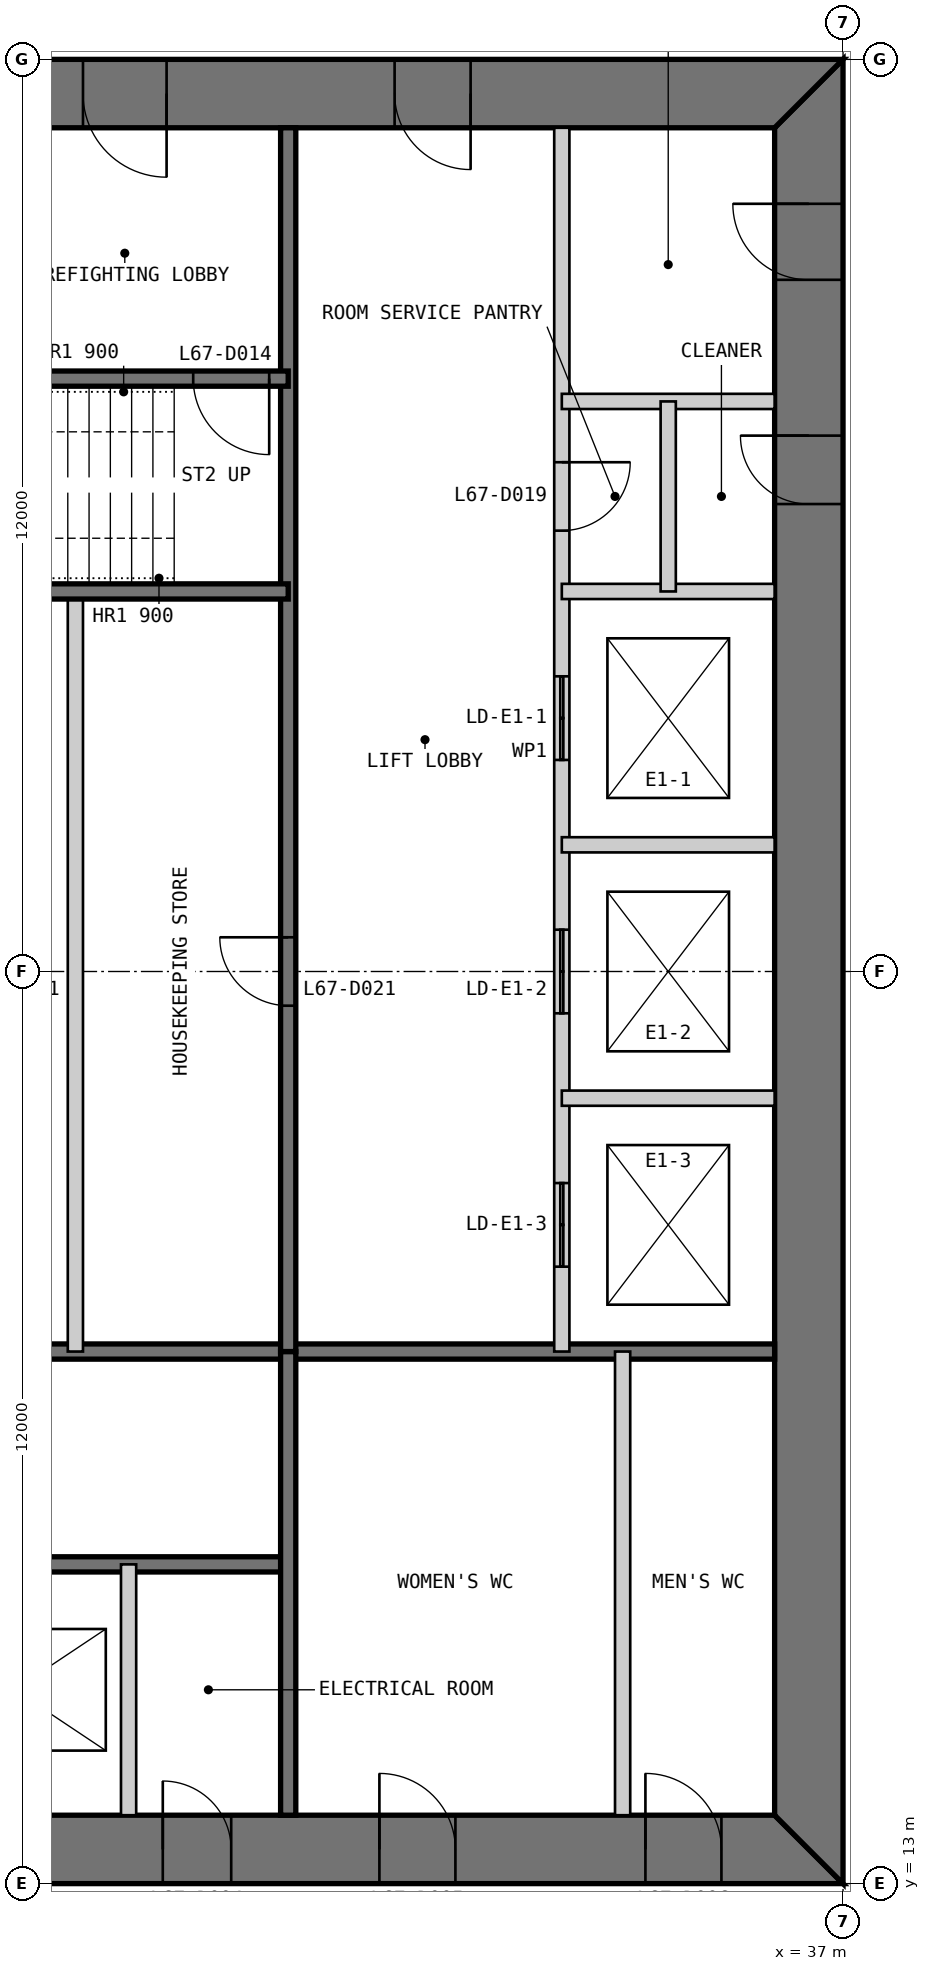
"""IFC4 building model, lengths in metres.
Left out: names, types, materials, properties, quantities, classifications, styles, units other than length and angle.
Written with IfcOpenShell. Run it as: python <this file> out.ifc"""

import sys

from ifc_helpers import new_model, si_unit, direction, frame, frame_2d, origin, place, context, subcontext, project, spatial, polyline, rectangle, outline, extrude, element, fill, save


model = new_model("IFC4")
c1 = context("Model", 3, precision=1e-05, world=origin(), true_north=direction((0.0, 1.0)))
c2 = subcontext(c1, "Body", "Model", "MODEL_VIEW")
j1 = project(units=[si_unit("LENGTHUNIT", "METRE"), si_unit("PLANEANGLEUNIT", "RADIAN")], contexts=[c1])
p1 = place(None, origin())
s1 = spatial("IfcSite", under=j1, at=p1, CompositionType="ELEMENT")
p2 = place(p1, origin())
s2 = spatial("IfcBuilding", under=s1, at=p2, CompositionType="ELEMENT")
p3 = place(p2, frame((0.0, 0.0, 279.8)))
s3 = spatial("IfcBuildingStorey", under=s2, at=p3, CompositionType="ELEMENT", Elevation=279.8)
p4 = place(p3, frame((13.0, 13.45, 0.0), z_axis=(0.0, 0.0, 1.0), x_axis=(1.0, 0.0, 0.0)))
e1 = element("IfcWall", 1, at=p4, inside=s3, PredefinedType="SHEAR", context=c2, shape_type="SweptSolid", body=[
    extrude(outline(polyline([(0.0, -0.45), (24.0, -0.45), (23.1, 0.45), (0.9, 0.45), (0.0, -0.45)])), origin(), (0.0, 0.0, 1.0), 3.4),
])
p5 = place(p4, frame((4.9, 0.0, 0.0)))
e2 = element("IfcOpeningElement", 2, at=p5, cuts=e1, PredefinedType="OPENING", context=c2, shape_type="SweptSolid", body=[
    extrude(rectangle(XDim=1.0, YDim=2.2, at=frame_2d((0.5, 1.1))), frame((0.0, 0.46, 0.0), z_axis=(0.0, -1.0, 0.0), x_axis=(1.0, 0.0, 0.0)), (0.0, 0.0, 1.0), 0.92),
])
p6 = place(p4, frame((8.9, 0.0, 0.0)))
e3 = element("IfcOpeningElement", 3, at=p6, cuts=e1, PredefinedType="OPENING", context=c2, shape_type="SweptSolid", body=[
    extrude(rectangle(XDim=1.1, YDim=2.2, at=frame_2d((0.55, 1.1))), frame((0.0, 0.46, 0.0), z_axis=(0.0, -1.0, 0.0), x_axis=(1.0, 0.0, 0.0)), (0.0, 0.0, 1.0), 0.92),
])
p7 = place(p4, frame((15.05, 0.0, 0.0)))
e4 = element("IfcOpeningElement", 4, at=p7, cuts=e1, PredefinedType="OPENING", context=c2, shape_type="SweptSolid", body=[
    extrude(rectangle(XDim=0.9, YDim=2.2, at=frame_2d((0.45, 1.1))), frame((0.0, 0.46, 0.0), z_axis=(0.0, -1.0, 0.0), x_axis=(1.0, 0.0, 0.0)), (0.0, 0.0, 1.0), 0.92),
])
p8 = place(p4, frame((17.9, 0.0, 0.0)))
e5 = element("IfcOpeningElement", 5, at=p8, cuts=e1, PredefinedType="OPENING", context=c2, shape_type="SweptSolid", body=[
    extrude(rectangle(XDim=1.0, YDim=2.2, at=frame_2d((0.5, 1.1))), frame((0.0, 0.46, 0.0), z_axis=(0.0, -1.0, 0.0), x_axis=(1.0, 0.0, 0.0)), (0.0, 0.0, 1.0), 0.92),
])
p9 = place(p4, frame((21.4, 0.0, 0.0)))
e6 = element("IfcOpeningElement", 6, at=p9, cuts=e1, PredefinedType="OPENING", context=c2, shape_type="SweptSolid", body=[
    extrude(rectangle(XDim=1.0, YDim=2.2, at=frame_2d((0.5, 1.1))), frame((0.0, 0.46, 0.0), z_axis=(0.0, -1.0, 0.0), x_axis=(1.0, 0.0, 0.0)), (0.0, 0.0, 1.0), 0.92),
])
p10 = place(p3, frame((36.55, 13.9, 0.0), z_axis=(0.0, 0.0, 1.0), x_axis=(0.0, 1.0, 0.0)))
e7 = element("IfcWall", 7, at=p10, inside=s3, PredefinedType="SHEAR", context=c2, shape_type="SweptSolid", body=[
    extrude(outline(polyline([(-0.9, -0.45), (23.1, -0.45), (22.2, 0.45), (0.0, 0.45), (-0.9, -0.45)])), origin(), (0.0, 0.0, 1.0), 3.4),
])
p11 = place(p10, frame((20.2, 0.0, 0.0)))
e8 = element("IfcOpeningElement", 8, at=p11, cuts=e7, PredefinedType="OPENING", context=c2, shape_type="SweptSolid", body=[
    extrude(rectangle(XDim=1.0, YDim=2.2, at=frame_2d((0.5, 1.1))), frame((0.0, 0.46, 0.0), z_axis=(0.0, -1.0, 0.0), x_axis=(1.0, 0.0, 0.0)), (0.0, 0.0, 1.0), 0.92),
])
p12 = place(p10, frame((17.25, 0.0, 0.0)))
e9 = element("IfcOpeningElement", 9, at=p12, cuts=e7, PredefinedType="OPENING", context=c2, shape_type="SweptSolid", body=[
    extrude(rectangle(XDim=0.9, YDim=2.2, at=frame_2d((0.45, 1.1))), frame((0.0, 0.46, 0.0), z_axis=(0.0, -1.0, 0.0), x_axis=(1.0, 0.0, 0.0)), (0.0, 0.0, 1.0), 0.92),
])
p13 = place(p3, frame((37.0, 36.55, 0.0), z_axis=(0.0, 0.0, 1.0), x_axis=(-1.0, 0.0, 0.0)))
e10 = element("IfcWall", 10, at=p13, inside=s3, PredefinedType="SHEAR", context=c2, shape_type="SweptSolid", body=[
    extrude(outline(polyline([(0.0, -0.45), (24.0, -0.45), (23.1, 0.45), (0.9, 0.45), (0.0, -0.45)])), origin(), (0.0, 0.0, 1.0), 3.4),
])
p14 = place(p13, frame((4.9, 0.0, 0.0)))
e11 = element("IfcOpeningElement", 11, at=p14, cuts=e10, PredefinedType="OPENING", context=c2, shape_type="SweptSolid", body=[
    extrude(rectangle(XDim=1.0, YDim=2.2, at=frame_2d((0.5, 1.1))), frame((0.0, 0.46, 0.0), z_axis=(0.0, -1.0, 0.0), x_axis=(1.0, 0.0, 0.0)), (0.0, 0.0, 1.0), 0.92),
])
p15 = place(p13, frame((8.9, 0.0, 0.0)))
e12 = element("IfcOpeningElement", 12, at=p15, cuts=e10, PredefinedType="OPENING", context=c2, shape_type="SweptSolid", body=[
    extrude(rectangle(XDim=1.1, YDim=2.2, at=frame_2d((0.55, 1.1))), frame((0.0, 0.46, 0.0), z_axis=(0.0, -1.0, 0.0), x_axis=(1.0, 0.0, 0.0)), (0.0, 0.0, 1.0), 0.92),
])
p16 = place(p13, frame((15.05, 0.0, 0.0)))
e13 = element("IfcOpeningElement", 13, at=p16, cuts=e10, PredefinedType="OPENING", context=c2, shape_type="SweptSolid", body=[
    extrude(rectangle(XDim=0.9, YDim=2.2, at=frame_2d((0.45, 1.1))), frame((0.0, 0.46, 0.0), z_axis=(0.0, -1.0, 0.0), x_axis=(1.0, 0.0, 0.0)), (0.0, 0.0, 1.0), 0.92),
])
p17 = place(p13, frame((17.9, 0.0, 0.0)))
e14 = element("IfcOpeningElement", 14, at=p17, cuts=e10, PredefinedType="OPENING", context=c2, shape_type="SweptSolid", body=[
    extrude(rectangle(XDim=1.0, YDim=2.2, at=frame_2d((0.5, 1.1))), frame((0.0, 0.46, 0.0), z_axis=(0.0, -1.0, 0.0), x_axis=(1.0, 0.0, 0.0)), (0.0, 0.0, 1.0), 0.92),
])
p18 = place(p13, frame((21.4, 0.0, 0.0)))
e15 = element("IfcOpeningElement", 15, at=p18, cuts=e10, PredefinedType="OPENING", context=c2, shape_type="SweptSolid", body=[
    extrude(rectangle(XDim=1.0, YDim=2.2, at=frame_2d((0.5, 1.1))), frame((0.0, 0.46, 0.0), z_axis=(0.0, -1.0, 0.0), x_axis=(1.0, 0.0, 0.0)), (0.0, 0.0, 1.0), 0.92),
])
p19 = place(p3, frame((20.3, 17.2, 0.0), z_axis=(0.0, 0.0, 1.0), x_axis=(1.0, 0.0, 0.0)))
e16 = element("IfcWall", 16, at=p19, inside=s3, PredefinedType="SOLIDWALL", context=c2, shape_type="SweptSolid", body=[
    extrude(rectangle(XDim=9.4, YDim=0.2, at=frame_2d((4.7, 0.0))), origin(), (0.0, 0.0, 1.0), 3.2),
])
p20 = place(p19, frame((0.25, 0.0, 0.0)))
e17 = element("IfcOpeningElement", 17, at=p20, cuts=e16, PredefinedType="OPENING", context=c2, shape_type="SweptSolid", body=[
    extrude(rectangle(XDim=1.0, YDim=2.2, at=frame_2d((0.5, 1.1))), frame((0.0, 0.11, 0.0), z_axis=(0.0, -1.0, 0.0), x_axis=(1.0, 0.0, 0.0)), (0.0, 0.0, 1.0), 0.22),
])
p21 = place(p3, frame((20.3, 20.0, 0.0), z_axis=(0.0, 0.0, 1.0), x_axis=(1.0, 0.0, 0.0)))
e18 = element("IfcWall", 18, at=p21, inside=s3, PredefinedType="SOLIDWALL", context=c2, shape_type="SweptSolid", body=[
    extrude(rectangle(XDim=15.8, YDim=0.2, at=frame_2d((7.9, 0.0))), origin(), (0.0, 0.0, 1.0), 3.2),
])
p22 = place(p3, frame((27.6, 13.9, 0.0), z_axis=(0.0, 0.0, 1.0), x_axis=(0.0, 1.0, 0.0)))
e19 = element("IfcWall", 19, at=p22, inside=s3, PredefinedType="PARTITIONING", context=c2, shape_type="SweptSolid", body=[
    extrude(rectangle(XDim=3.3, YDim=0.2, at=frame_2d((1.65, 0.0))), origin(), (0.0, 0.0, 1.0), 3.2),
])
p23 = place(p3, frame((29.7, 13.9, 0.0), z_axis=(0.0, 0.0, 1.0), x_axis=(0.0, 1.0, 0.0)))
e20 = element("IfcWall", 20, at=p23, inside=s3, PredefinedType="SOLIDWALL", context=c2, shape_type="SweptSolid", body=[
    extrude(rectangle(XDim=6.1, YDim=0.2, at=frame_2d((3.05, 0.0))), origin(), (0.0, 0.0, 1.0), 3.2),
])
p24 = place(p3, frame((34.1, 13.9, 0.0), z_axis=(0.0, 0.0, 1.0), x_axis=(0.0, 1.0, 0.0)))
e21 = element("IfcWall", 21, at=p24, inside=s3, PredefinedType="PARTITIONING", context=c2, shape_type="SweptSolid", body=[
    extrude(rectangle(XDim=6.1, YDim=0.2, at=frame_2d((3.05, 0.0))), origin(), (0.0, 0.0, 1.0), 3.2),
])
p25 = place(p3, frame((33.3, 36.1, 0.0), z_axis=(0.0, 0.0, 1.0), x_axis=(0.0, -1.0, 0.0)))
e22 = element("IfcWall", 22, at=p25, inside=s3, PredefinedType="PARTITIONING", context=c2, shape_type="SweptSolid", body=[
    extrude(rectangle(XDim=16.1, YDim=0.2, at=frame_2d((8.05, 0.0))), origin(), (0.0, 0.0, 1.0), 3.2),
])
p26 = place(p25, frame((4.4, 0.0, 0.0)))
e23 = element("IfcOpeningElement", 23, at=p26, cuts=e22, PredefinedType="OPENING", context=c2, shape_type="SweptSolid", body=[
    extrude(rectangle(XDim=0.9, YDim=2.2, at=frame_2d((0.45, 1.1))), frame((0.0, 0.11, 0.0), z_axis=(0.0, -1.0, 0.0), x_axis=(1.0, 0.0, 0.0)), (0.0, 0.0, 1.0), 0.22),
])
p27 = place(p25, frame((7.217, 0.0, 0.0)))
e24 = element("IfcOpeningElement", 24, at=p27, cuts=e22, PredefinedType="OPENING", context=c2, shape_type="SweptSolid", body=[
    extrude(rectangle(XDim=1.1, YDim=2.2, at=frame_2d((0.55, 1.1))), frame((0.0, 0.11, 0.0), z_axis=(0.0, -1.0, 0.0), x_axis=(1.0, 0.0, 0.0)), (0.0, 0.0, 1.0), 0.22),
])
p28 = place(p25, frame((10.55, 0.0, 0.0)))
e25 = element("IfcOpeningElement", 25, at=p28, cuts=e22, PredefinedType="OPENING", context=c2, shape_type="SweptSolid", body=[
    extrude(rectangle(XDim=1.1, YDim=2.2, at=frame_2d((0.55, 1.1))), frame((0.0, 0.11, 0.0), z_axis=(0.0, -1.0, 0.0), x_axis=(1.0, 0.0, 0.0)), (0.0, 0.0, 1.0), 0.22),
])
p29 = place(p25, frame((13.883, 0.0, 0.0)))
e26 = element("IfcOpeningElement", 26, at=p29, cuts=e22, PredefinedType="OPENING", context=c2, shape_type="SweptSolid", body=[
    extrude(rectangle(XDim=1.1, YDim=2.2, at=frame_2d((0.55, 1.1))), frame((0.0, 0.11, 0.0), z_axis=(0.0, -1.0, 0.0), x_axis=(1.0, 0.0, 0.0)), (0.0, 0.0, 1.0), 0.22),
])
p30 = place(p3, frame((29.7, 36.1, 0.0), z_axis=(0.0, 0.0, 1.0), x_axis=(0.0, -1.0, 0.0)))
e27 = element("IfcWall", 27, at=p30, inside=s3, PredefinedType="SOLIDWALL", context=c2, shape_type="SweptSolid", body=[
    extrude(rectangle(XDim=16.1, YDim=0.2, at=frame_2d((8.05, 0.0))), origin(), (0.0, 0.0, 1.0), 3.2),
])
p31 = place(p30, frame((10.65, 0.0, 0.0)))
e28 = element("IfcOpeningElement", 28, at=p31, cuts=e27, PredefinedType="OPENING", context=c2, shape_type="SweptSolid", body=[
    extrude(rectangle(XDim=0.9, YDim=2.2, at=frame_2d((0.45, 1.1))), frame((0.0, 0.11, 0.0), z_axis=(0.0, -1.0, 0.0), x_axis=(1.0, 0.0, 0.0)), (0.0, 0.0, 1.0), 0.22),
])
for number, where, z_axis, x_axis in (
    (29, (36.1, 30.0, 0.0), (0.0, 0.0, 1.0), (-1.0, 0.0, 0.0)),
    (30, (36.1, 26.667, 0.0), (0.0, 0.0, 1.0), (-1.0, 0.0, 0.0)),
    (31, (36.1, 23.333, 0.0), (0.0, 0.0, 1.0), (-1.0, 0.0, 0.0)),
):
    element("IfcWall", number, at=place(p3, frame(where, z_axis=z_axis, x_axis=x_axis)), inside=s3, PredefinedType="PARTITIONING", context=c2, shape_type="SweptSolid", body=[
        extrude(rectangle(XDim=2.8, YDim=0.2, at=frame_2d((1.4, 0.0))), origin(), (0.0, 0.0, 1.0), 3.2),
    ])
p32 = place(p3, frame((26.9, 30.0, 0.0), z_axis=(0.0, 0.0, 1.0), x_axis=(0.0, -1.0, 0.0)))
e32 = element("IfcWall", 32, at=p32, inside=s3, PredefinedType="PARTITIONING", context=c2, shape_type="SweptSolid", body=[
    extrude(rectangle(XDim=10.0, YDim=0.2, at=frame_2d((5.0, 0.0))), origin(), (0.0, 0.0, 1.0), 3.2),
])
p33 = place(p3, frame((29.7, 32.8, 0.0), z_axis=(0.0, 0.0, 1.0), x_axis=(-1.0, 0.0, 0.0)))
e33 = element("IfcWall", 33, at=p33, inside=s3, PredefinedType="SOLIDWALL", context=c2, shape_type="SweptSolid", body=[
    extrude(rectangle(XDim=9.4, YDim=0.2, at=frame_2d((4.7, 0.0))), origin(), (0.0, 0.0, 1.0), 3.2),
])
p34 = place(p33, frame((0.25, 0.0, 0.0)))
e34 = element("IfcOpeningElement", 34, at=p34, cuts=e33, PredefinedType="OPENING", context=c2, shape_type="SweptSolid", body=[
    extrude(rectangle(XDim=1.0, YDim=2.2, at=frame_2d((0.5, 1.1))), frame((0.0, 0.11, 0.0), z_axis=(0.0, -1.0, 0.0), x_axis=(1.0, 0.0, 0.0)), (0.0, 0.0, 1.0), 0.22),
])
p35 = place(p3, frame((29.7, 30.0, 0.0), z_axis=(0.0, 0.0, 1.0), x_axis=(-1.0, 0.0, 0.0)))
e35 = element("IfcWall", 35, at=p35, inside=s3, PredefinedType="SOLIDWALL", context=c2, shape_type="SweptSolid", body=[
    extrude(rectangle(XDim=15.8, YDim=0.2, at=frame_2d((7.9, 0.0))), origin(), (0.0, 0.0, 1.0), 3.2),
])
p36 = place(p3, frame((36.1, 32.5, 0.0), z_axis=(0.0, 0.0, 1.0), x_axis=(-1.0, 0.0, 0.0)))
e36 = element("IfcWall", 36, at=p36, inside=s3, PredefinedType="PARTITIONING", context=c2, shape_type="SweptSolid", body=[
    extrude(rectangle(XDim=2.8, YDim=0.2, at=frame_2d((1.4, 0.0))), origin(), (0.0, 0.0, 1.0), 3.2),
])
p37 = place(p3, frame((34.7, 32.5, 0.0), z_axis=(0.0, 0.0, 1.0), x_axis=(0.0, -1.0, 0.0)))
e37 = element("IfcWall", 37, at=p37, inside=s3, PredefinedType="PARTITIONING", context=c2, shape_type="SweptSolid", body=[
    extrude(rectangle(XDim=2.5, YDim=0.2, at=frame_2d((1.25, 0.0))), origin(), (0.0, 0.0, 1.0), 3.2),
])
p38 = place(p7, origin())
e38 = element("IfcDoor", 38, at=p38, inside=s3, OperationType="SINGLE_SWING_LEFT", PredefinedType="DOOR", context=c2, shape_type="SweptSolid", body=[
    extrude(rectangle(XDim=0.9, YDim=2.2, at=frame_2d((0.45, 1.1))), frame((0.0, 0.025, 0.0), z_axis=(0.0, -1.0, 0.0), x_axis=(1.0, 0.0, 0.0)), (0.0, 0.0, 1.0), 0.05),
    extrude(outline(polyline([(0.0, 0.0), (0.04, 0.0), (0.04, 2.16), (0.86, 2.16), (0.86, 0.0), (0.9, 0.0), (0.9, 2.2), (0.0, 2.2), (0.0, 0.0)])), frame((0.0, 0.3, 0.0), z_axis=(0.0, -1.0, 0.0), x_axis=(1.0, 0.0, 0.0)), (0.0, 0.0, 1.0), 0.6),
])
fill(e4, e38)
p39 = place(p8, origin())
e39 = element("IfcDoor", 39, at=p39, inside=s3, OperationType="SINGLE_SWING_LEFT", PredefinedType="DOOR", context=c2, shape_type="SweptSolid", body=[
    extrude(rectangle(XDim=1.0, YDim=2.2, at=frame_2d((0.5, 1.1))), frame((0.0, 0.025, 0.0), z_axis=(0.0, -1.0, 0.0), x_axis=(1.0, 0.0, 0.0)), (0.0, 0.0, 1.0), 0.05),
    extrude(outline(polyline([(0.0, 0.0), (0.04, 0.0), (0.04, 2.16), (0.96, 2.16), (0.96, 0.0), (1.0, 0.0), (1.0, 2.2), (0.0, 2.2), (0.0, 0.0)])), frame((0.0, 0.3, 0.0), z_axis=(0.0, -1.0, 0.0), x_axis=(1.0, 0.0, 0.0)), (0.0, 0.0, 1.0), 0.6),
])
fill(e5, e39)
p40 = place(p9, origin())
e40 = element("IfcDoor", 40, at=p40, inside=s3, OperationType="SINGLE_SWING_LEFT", PredefinedType="DOOR", context=c2, shape_type="SweptSolid", body=[
    extrude(rectangle(XDim=1.0, YDim=2.2, at=frame_2d((0.5, 1.1))), frame((0.0, 0.025, 0.0), z_axis=(0.0, -1.0, 0.0), x_axis=(1.0, 0.0, 0.0)), (0.0, 0.0, 1.0), 0.05),
    extrude(outline(polyline([(0.0, 0.0), (0.04, 0.0), (0.04, 2.16), (0.96, 2.16), (0.96, 0.0), (1.0, 0.0), (1.0, 2.2), (0.0, 2.2), (0.0, 0.0)])), frame((0.0, 0.3, 0.0), z_axis=(0.0, -1.0, 0.0), x_axis=(1.0, 0.0, 0.0)), (0.0, 0.0, 1.0), 0.6),
])
fill(e6, e40)
p41 = place(p14, origin())
e41 = element("IfcDoor", 41, at=p41, inside=s3, OperationType="SINGLE_SWING_LEFT", PredefinedType="DOOR", context=c2, shape_type="SweptSolid", body=[
    extrude(rectangle(XDim=1.0, YDim=2.2, at=frame_2d((0.5, 1.1))), frame((0.0, 0.025, 0.0), z_axis=(0.0, -1.0, 0.0), x_axis=(1.0, 0.0, 0.0)), (0.0, 0.0, 1.0), 0.05),
    extrude(outline(polyline([(0.0, 0.0), (0.04, 0.0), (0.04, 2.16), (0.96, 2.16), (0.96, 0.0), (1.0, 0.0), (1.0, 2.2), (0.0, 2.2), (0.0, 0.0)])), frame((0.0, 0.3, 0.0), z_axis=(0.0, -1.0, 0.0), x_axis=(1.0, 0.0, 0.0)), (0.0, 0.0, 1.0), 0.6),
])
fill(e11, e41)
p42 = place(p15, origin())
e42 = element("IfcDoor", 42, at=p42, inside=s3, OperationType="SINGLE_SWING_LEFT", PredefinedType="DOOR", context=c2, shape_type="SweptSolid", body=[
    extrude(rectangle(XDim=1.1, YDim=2.2, at=frame_2d((0.55, 1.1))), frame((0.0, 0.025, 0.0), z_axis=(0.0, -1.0, 0.0), x_axis=(1.0, 0.0, 0.0)), (0.0, 0.0, 1.0), 0.05),
    extrude(outline(polyline([(0.0, 0.0), (0.04, 0.0), (0.04, 2.16), (1.06, 2.16), (1.06, 0.0), (1.1, 0.0), (1.1, 2.2), (0.0, 2.2), (0.0, 0.0)])), frame((0.0, 0.3, 0.0), z_axis=(0.0, -1.0, 0.0), x_axis=(1.0, 0.0, 0.0)), (0.0, 0.0, 1.0), 0.6),
])
fill(e12, e42)
p43 = place(p34, origin())
e43 = element("IfcDoor", 43, at=p43, inside=s3, OperationType="SINGLE_SWING_LEFT", PredefinedType="DOOR", context=c2, shape_type="SweptSolid", body=[
    extrude(rectangle(XDim=1.0, YDim=2.2, at=frame_2d((0.5, 1.1))), frame((0.0, 0.025, 0.0), z_axis=(0.0, -1.0, 0.0), x_axis=(1.0, 0.0, 0.0)), (0.0, 0.0, 1.0), 0.05),
])
fill(e34, e43)
p44 = place(p11, origin())
e44 = element("IfcDoor", 44, at=p44, inside=s3, OperationType="SINGLE_SWING_RIGHT", PredefinedType="DOOR", context=c2, shape_type="SweptSolid", body=[
    extrude(rectangle(XDim=1.0, YDim=2.2, at=frame_2d((0.5, 1.1))), frame((0.0, 0.025, 0.0), z_axis=(0.0, -1.0, 0.0), x_axis=(1.0, 0.0, 0.0)), (0.0, 0.0, 1.0), 0.05),
    extrude(outline(polyline([(0.0, 0.0), (0.04, 0.0), (0.04, 2.16), (0.96, 2.16), (0.96, 0.0), (1.0, 0.0), (1.0, 2.2), (0.0, 2.2), (0.0, 0.0)])), frame((0.0, 0.3, 0.0), z_axis=(0.0, -1.0, 0.0), x_axis=(1.0, 0.0, 0.0)), (0.0, 0.0, 1.0), 0.6),
])
fill(e8, e44)
p45 = place(p26, origin())
e45 = element("IfcDoor", 45, at=p45, inside=s3, OperationType="SINGLE_SWING_LEFT", PredefinedType="DOOR", context=c2, shape_type="SweptSolid", body=[
    extrude(rectangle(XDim=0.9, YDim=2.2, at=frame_2d((0.45, 1.1))), frame((0.0, 0.025, 0.0), z_axis=(0.0, -1.0, 0.0), x_axis=(1.0, 0.0, 0.0)), (0.0, 0.0, 1.0), 0.05),
])
fill(e23, e45)
p46 = place(p12, origin())
e46 = element("IfcDoor", 46, at=p46, inside=s3, OperationType="SINGLE_SWING_RIGHT", PredefinedType="DOOR", context=c2, shape_type="SweptSolid", body=[
    extrude(rectangle(XDim=0.9, YDim=2.2, at=frame_2d((0.45, 1.1))), frame((0.0, 0.025, 0.0), z_axis=(0.0, -1.0, 0.0), x_axis=(1.0, 0.0, 0.0)), (0.0, 0.0, 1.0), 0.05),
    extrude(outline(polyline([(0.0, 0.0), (0.04, 0.0), (0.04, 2.16), (0.86, 2.16), (0.86, 0.0), (0.9, 0.0), (0.9, 2.2), (0.0, 2.2), (0.0, 0.0)])), frame((0.0, 0.3, 0.0), z_axis=(0.0, -1.0, 0.0), x_axis=(1.0, 0.0, 0.0)), (0.0, 0.0, 1.0), 0.6),
])
fill(e9, e46)
p47 = place(p31, frame((0.9, 0.0, 0.0), z_axis=(0.0, 0.0, 1.0), x_axis=(-1.0, 0.0, 0.0)))
e47 = element("IfcDoor", 47, at=p47, inside=s3, OperationType="SINGLE_SWING_RIGHT", PredefinedType="DOOR", context=c2, shape_type="SweptSolid", body=[
    extrude(rectangle(XDim=0.9, YDim=2.2, at=frame_2d((0.45, 1.1))), frame((0.0, 0.025, 0.0), z_axis=(0.0, -1.0, 0.0), x_axis=(1.0, 0.0, 0.0)), (0.0, 0.0, 1.0), 0.05),
])
fill(e28, e47)
p48 = place(p27, origin())
e48 = element("IfcDoor", 48, at=p48, inside=s3, OperationType="DOUBLE_DOOR_SLIDING", PredefinedType="DOOR", context=c2, shape_type="SweptSolid", body=[
    extrude(rectangle(XDim=1.1, YDim=2.2, at=frame_2d((0.55, 1.1))), frame((0.0, 0.025, 0.0), z_axis=(0.0, -1.0, 0.0), x_axis=(1.0, 0.0, 0.0)), (0.0, 0.0, 1.0), 0.05),
])
fill(e24, e48)
p49 = place(p28, origin())
e49 = element("IfcDoor", 49, at=p49, inside=s3, OperationType="DOUBLE_DOOR_SLIDING", PredefinedType="DOOR", context=c2, shape_type="SweptSolid", body=[
    extrude(rectangle(XDim=1.1, YDim=2.2, at=frame_2d((0.55, 1.1))), frame((0.0, 0.025, 0.0), z_axis=(0.0, -1.0, 0.0), x_axis=(1.0, 0.0, 0.0)), (0.0, 0.0, 1.0), 0.05),
])
fill(e25, e49)
p50 = place(p29, origin())
e50 = element("IfcDoor", 50, at=p50, inside=s3, OperationType="DOUBLE_DOOR_SLIDING", PredefinedType="DOOR", context=c2, shape_type="SweptSolid", body=[
    extrude(rectangle(XDim=1.1, YDim=2.2, at=frame_2d((0.55, 1.1))), frame((0.0, 0.025, 0.0), z_axis=(0.0, -1.0, 0.0), x_axis=(1.0, 0.0, 0.0)), (0.0, 0.0, 1.0), 0.05),
])
fill(e26, e50)
save(model, sys.argv[1])
